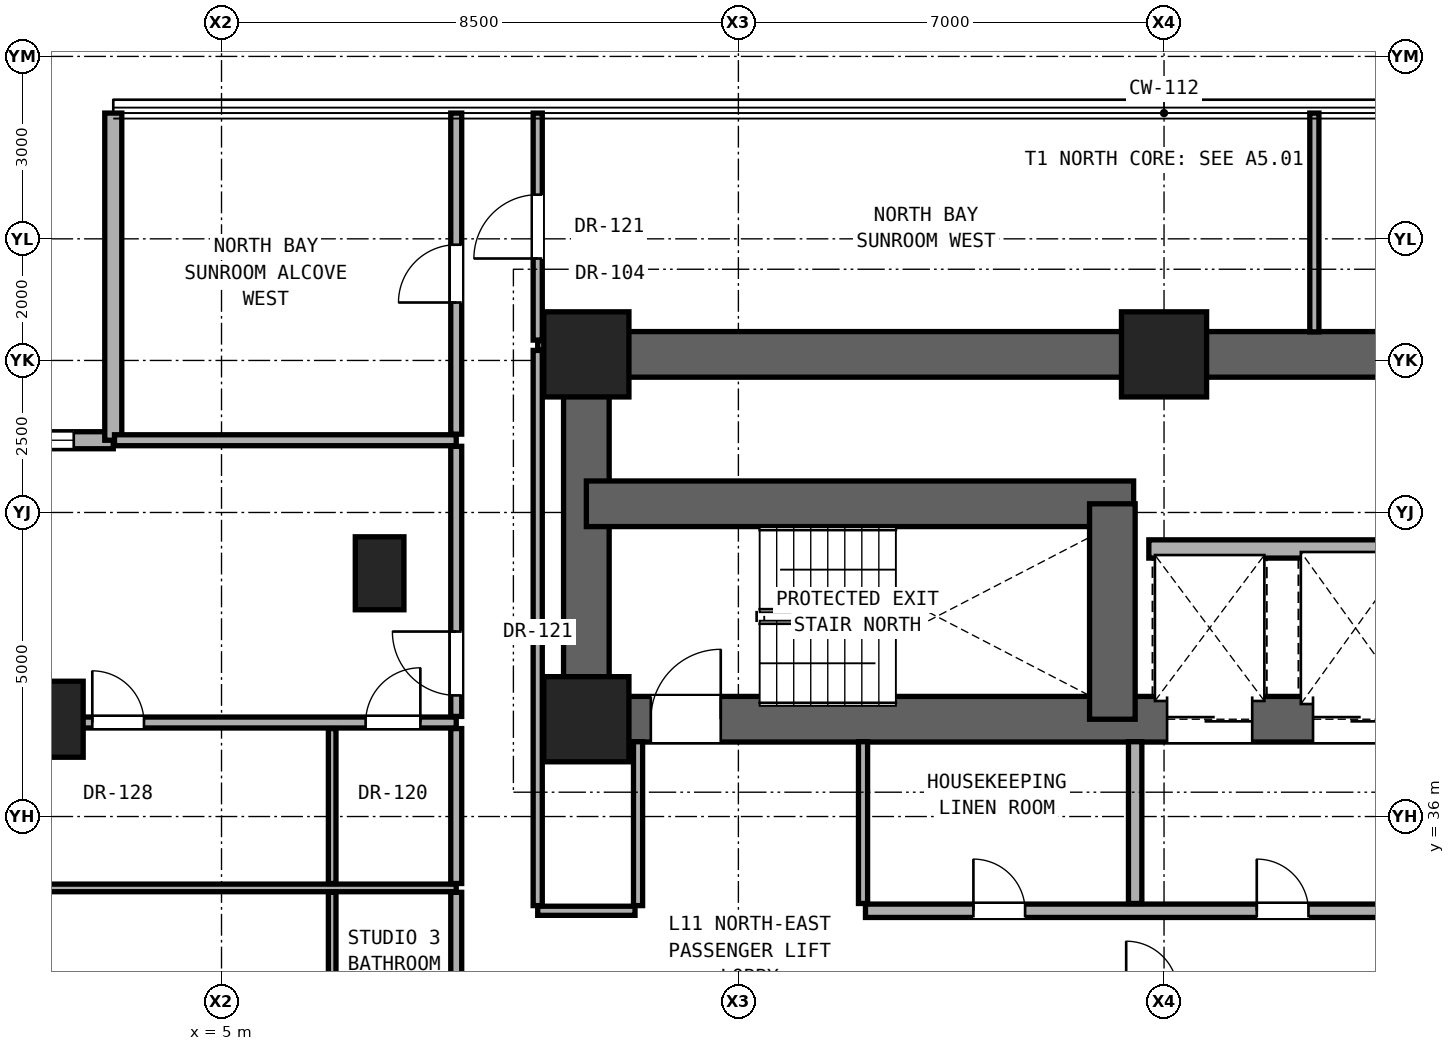
"""IFC4 building model, lengths in metres.
Left out: names, types, materials, properties, quantities, classifications, styles, units other than length and angle.
Written with IfcOpenShell. Run it as: python <this file> out.ifc"""

import sys

from ifc_helpers import new_model, si_unit, direction, frame, frame_2d, origin, origin_2d, place, context, subcontext, project, spatial, rectangle, hollow_rectangle, extrude, element, fill, save


model = new_model("IFC4")
c1 = context("Model", 3, precision=1e-05, world=origin(), true_north=direction((0.0, 1.0)))
c2 = subcontext(c1, "Body", "Model", "MODEL_VIEW")
j1 = project(units=[si_unit("LENGTHUNIT", "METRE"), si_unit("PLANEANGLEUNIT", "RADIAN")], contexts=[c1])
p1 = place(None, origin())
s1 = spatial("IfcSite", under=j1, at=p1, CompositionType="ELEMENT")
p2 = place(p1, origin())
s2 = spatial("IfcBuilding", under=s1, at=p2, CompositionType="ELEMENT")
p3 = place(p2, frame((0.0, 0.0, 42.2)))
s3 = spatial("IfcBuildingStorey", under=s2, at=p3, CompositionType="ELEMENT", Elevation=42.2)
for number, where, z_axis, x_axis in (
    (1, (11.0, 37.6, 0.0), (0.0, 0.0, 1.0), (1.0, 0.0, 0.0)),
    (2, (11.0, 43.6, 0.0), (0.0, 0.0, 1.0), (1.0, 0.0, 0.0)),
    (3, (20.5, 43.6, 0.0), (0.0, 0.0, 1.0), (1.0, 0.0, 0.0)),
):
    element("IfcColumn", number, at=place(p3, frame(where, z_axis=z_axis, x_axis=x_axis)), inside=s3, PredefinedType="COLUMN", context=c2, shape_type="SweptSolid", body=[
        extrude(rectangle(XDim=1.4, YDim=1.4, at=origin_2d()), origin(), (0.0, 0.0, 1.0), 3.3),
    ])
p4 = place(p3, frame((2.1, 37.6, 0.0), z_axis=(0.0, 0.0, 1.0), x_axis=(1.0, 0.0, 0.0)))
e4 = element("IfcColumn", 4, at=p4, inside=s3, PredefinedType="COLUMN", context=c2, shape_type="SweptSolid", body=[
    extrude(hollow_rectangle(XDim=1.25, YDim=1.25, WallThickness=0.07, at=origin_2d()), origin(), (0.0, 0.0, 1.0), 3.3),
])
p5 = place(p3, frame((7.6, 40.0, 0.0), z_axis=(0.0, 0.0, 1.0), x_axis=(1.0, 0.0, 0.0)))
e5 = element("IfcColumn", 5, at=p5, inside=s3, PredefinedType="PILASTER", context=c2, shape_type="SweptSolid", body=[
    extrude(rectangle(XDim=0.8, YDim=1.2, at=origin_2d()), origin(), (0.0, 0.0, 1.0), 3.3),
])
p6 = place(p3, frame((11.0, 43.6, 0.0), z_axis=(0.0, 0.0, 1.0), x_axis=(1.0, 0.0, 0.0)))
e6 = element("IfcWall", 6, at=p6, inside=s3, PredefinedType="SHEAR", context=c2, shape_type="SweptSolid", body=[
    extrude(rectangle(XDim=19.0, YDim=0.75, at=frame_2d((9.5, 0.0))), origin(), (0.0, 0.0, 1.0), 3.06),
])
p7 = place(p3, frame((11.0, 37.6, 0.0), z_axis=(0.0, 0.0, 1.0), x_axis=(0.0, 1.0, 0.0)))
e7 = element("IfcWall", 7, at=p7, inside=s3, PredefinedType="SHEAR", context=c2, shape_type="SweptSolid", body=[
    extrude(rectangle(XDim=6.0, YDim=0.75, at=frame_2d((3.0, 0.0))), origin(), (0.0, 0.0, 1.0), 3.06),
])
p8 = place(p3, frame((11.0, 37.6, 0.0), z_axis=(0.0, 0.0, 1.0), x_axis=(1.0, 0.0, 0.0)))
e8 = element("IfcWall", 8, at=p8, inside=s3, PredefinedType="SHEAR", context=c2, shape_type="SweptSolid", body=[
    extrude(rectangle(XDim=19.0, YDim=0.75, at=frame_2d((9.5, 0.0))), origin(), (0.0, 0.0, 1.0), 3.06),
])
p9 = place(p8, frame((1.06, 0.0, 0.0)))
e9 = element("IfcOpeningElement", 9, at=p9, cuts=e8, PredefinedType="OPENING", context=c2, shape_type="SweptSolid", body=[
    extrude(rectangle(XDim=1.15, YDim=2.2, at=frame_2d((0.575, 1.1))), frame((0.0, 0.385, 0.0), z_axis=(0.0, -1.0, 0.0), x_axis=(1.0, 0.0, 0.0)), (0.0, 0.0, 1.0), 0.77),
])
p10 = place(p8, frame((9.55, 0.0, 0.0)))
e10 = element("IfcOpeningElement", 10, at=p10, cuts=e8, PredefinedType="OPENING", context=c2, shape_type="SweptSolid", body=[
    extrude(rectangle(XDim=1.4, YDim=2.35, at=frame_2d((0.7, 1.175))), frame((0.0, 0.385, 0.0), z_axis=(0.0, -1.0, 0.0), x_axis=(1.0, 0.0, 0.0)), (0.0, 0.0, 1.0), 0.77),
])
p11 = place(p8, frame((11.95, 0.0, 0.0)))
e11 = element("IfcOpeningElement", 11, at=p11, cuts=e8, PredefinedType="OPENING", context=c2, shape_type="SweptSolid", body=[
    extrude(rectangle(XDim=1.4, YDim=2.35, at=frame_2d((0.7, 1.175))), frame((0.0, 0.385, 0.0), z_axis=(0.0, -1.0, 0.0), x_axis=(1.0, 0.0, 0.0)), (0.0, 0.0, 1.0), 0.77),
])
p12 = place(p8, frame((14.4, 0.0, 0.0)))
e12 = element("IfcOpeningElement", 12, at=p12, cuts=e8, PredefinedType="OPENING", context=c2, shape_type="SweptSolid", body=[
    extrude(rectangle(XDim=1.3, YDim=2.3, at=frame_2d((0.65, 1.15))), frame((0.0, 0.385, 0.0), z_axis=(0.0, -1.0, 0.0), x_axis=(1.0, 0.0, 0.0)), (0.0, 0.0, 1.0), 0.77),
])
p13 = place(p8, frame((16.6, 0.0, 0.0)))
e13 = element("IfcOpeningElement", 13, at=p13, cuts=e8, PredefinedType="OPENING", context=c2, shape_type="SweptSolid", body=[
    extrude(rectangle(XDim=1.3, YDim=2.3, at=frame_2d((0.65, 1.15))), frame((0.0, 0.385, 0.0), z_axis=(0.0, -1.0, 0.0), x_axis=(1.0, 0.0, 0.0)), (0.0, 0.0, 1.0), 0.77),
])
p14 = place(p3, frame((11.0, 41.143, 0.0), z_axis=(0.0, 0.0, 1.0), x_axis=(1.0, 0.0, 0.0)))
e14 = element("IfcWall", 14, at=p14, inside=s3, PredefinedType="SHEAR", context=c2, shape_type="SweptSolid", body=[
    extrude(rectangle(XDim=9.0, YDim=0.75, at=frame_2d((4.5, 0.0))), origin(), (0.0, 0.0, 1.0), 3.06),
])
p15 = place(p3, frame((19.65, 37.6, 0.0), z_axis=(0.0, 0.0, 1.0), x_axis=(0.0, 1.0, 0.0)))
e15 = element("IfcWall", 15, at=p15, inside=s3, PredefinedType="SHEAR", context=c2, shape_type="SweptSolid", body=[
    extrude(rectangle(XDim=3.543, YDim=0.75, at=frame_2d((1.771, 0.0))), origin(), (0.0, 0.0, 1.0), 3.06),
])
p16 = place(p3, frame((3.22, 42.188, 0.0), z_axis=(0.0, 0.0, 1.0), x_axis=(-1.0, 0.0, 0.0)))
e16 = element("IfcWall", 16, at=p16, inside=s3, PredefinedType="SOLIDWALL", context=c2, shape_type="SweptSolid", body=[
    extrude(rectangle(XDim=5.38, YDim=0.28, at=frame_2d((2.69, 0.0))), origin(), (0.0, 0.0, 1.0), 3.04),
])
p17 = place(p16, frame((0.65, 0.0, 0.85)))
e17 = element("IfcOpeningElement", 17, at=p17, cuts=e16, PredefinedType="OPENING", context=c2, shape_type="SweptSolid", body=[
    extrude(rectangle(XDim=1.1, YDim=2.0, at=frame_2d((0.55, 1.0))), frame((0.0, 0.15, 0.0), z_axis=(0.0, -1.0, 0.0), x_axis=(1.0, 0.0, 0.0)), (0.0, 0.0, 1.0), 0.3),
])
p18 = place(p3, frame((3.22, 47.568, 0.0), z_axis=(0.0, 0.0, 1.0), x_axis=(0.0, -1.0, 0.0)))
e18 = element("IfcWall", 18, at=p18, inside=s3, PredefinedType="SOLIDWALL", context=c2, shape_type="SweptSolid", body=[
    extrude(rectangle(XDim=5.38, YDim=0.28, at=frame_2d((2.69, 0.0))), origin(), (0.0, 0.0, 1.0), 3.04),
])
p19 = place(p3, frame((10.2, 34.45, 0.0), z_axis=(0.0, 0.0, 1.0), x_axis=(1.0, 0.0, 0.0)))
e19 = element("IfcWall", 19, at=p19, inside=s3, PredefinedType="PARTITIONING", context=c2, shape_type="SweptSolid", body=[
    extrude(rectangle(XDim=1.6, YDim=0.15, at=frame_2d((0.8, 0.0))), origin(), (0.0, 0.0, 1.0), 2.104),
])
p20 = place(p3, frame((15.59, 34.45, 0.0), z_axis=(0.0, 0.0, 1.0), x_axis=(1.0, 0.0, 0.0)))
e20 = element("IfcWall", 20, at=p20, inside=s3, PredefinedType="SOLIDWALL", context=c2, shape_type="SweptSolid", body=[
    extrude(rectangle(XDim=15.21, YDim=0.22, at=frame_2d((7.605, 0.0))), origin(), (0.0, 0.0, 1.0), 2.104),
])
p21 = place(p20, frame((6.435, 0.0, 0.0)))
e21 = element("IfcOpeningElement", 21, at=p21, cuts=e20, PredefinedType="OPENING", context=c2, shape_type="SweptSolid", body=[
    extrude(rectangle(XDim=0.85, YDim=2.01, at=frame_2d((0.425, 1.005))), frame((0.0, 0.12, 0.0), z_axis=(0.0, -1.0, 0.0), x_axis=(1.0, 0.0, 0.0)), (0.0, 0.0, 1.0), 0.24),
])
p22 = place(p20, frame((11.135, 0.0, 0.0)))
e22 = element("IfcOpeningElement", 22, at=p22, cuts=e20, PredefinedType="OPENING", context=c2, shape_type="SweptSolid", body=[
    extrude(rectangle(XDim=0.85, YDim=2.01, at=frame_2d((0.425, 1.005))), frame((0.0, 0.12, 0.0), z_axis=(0.0, -1.0, 0.0), x_axis=(1.0, 0.0, 0.0)), (0.0, 0.0, 1.0), 0.24),
])
p23 = place(p20, frame((1.775, 0.0, 0.0)))
e23 = element("IfcOpeningElement", 23, at=p23, cuts=e20, PredefinedType="OPENING", context=c2, shape_type="SweptSolid", body=[
    extrude(rectangle(XDim=0.85, YDim=2.01, at=frame_2d((0.425, 1.005))), frame((0.0, 0.12, 0.0), z_axis=(0.0, -1.0, 0.0), x_axis=(1.0, 0.0, 0.0)), (0.0, 0.0, 1.0), 0.24),
])
p24 = place(p3, frame((-2.16, 34.826, 0.0), z_axis=(0.0, 0.0, 1.0), x_axis=(1.0, 0.0, 0.0)))
e24 = element("IfcWall", 24, at=p24, inside=s3, PredefinedType="PARTITIONING", context=c2, shape_type="SweptSolid", body=[
    extrude(rectangle(XDim=11.02, YDim=0.125, at=frame_2d((5.51, 0.0))), origin(), (0.0, 0.0, 1.0), 2.125),
])
p25 = place(p3, frame((-2.16, 37.546, 0.0), z_axis=(0.0, 0.0, 1.0), x_axis=(1.0, 0.0, 0.0)))
e25 = element("IfcWall", 25, at=p25, inside=s3, PredefinedType="PARTITIONING", context=c2, shape_type="SweptSolid", body=[
    extrude(rectangle(XDim=11.02, YDim=0.18, at=frame_2d((5.51, 0.0))), origin(), (0.0, 0.0, 1.0), 2.125),
])
p26 = place(p25, frame((5.035, 0.0, 0.0)))
e26 = element("IfcOpeningElement", 26, at=p26, cuts=e25, PredefinedType="OPENING", context=c2, shape_type="SweptSolid", body=[
    extrude(rectangle(XDim=0.85, YDim=2.01, at=frame_2d((0.425, 1.005))), frame((0.0, 0.1, 0.0), z_axis=(0.0, -1.0, 0.0), x_axis=(1.0, 0.0, 0.0)), (0.0, 0.0, 1.0), 0.2),
])
p27 = place(p25, frame((9.53, 0.0, 0.0)))
e27 = element("IfcOpeningElement", 27, at=p27, cuts=e25, PredefinedType="OPENING", context=c2, shape_type="SweptSolid", body=[
    extrude(rectangle(XDim=0.9, YDim=2.1, at=frame_2d((0.45, 1.05))), frame((0.0, 0.1, 0.0), z_axis=(0.0, -1.0, 0.0), x_axis=(1.0, 0.0, 0.0)), (0.0, 0.0, 1.0), 0.2),
])
p28 = place(p3, frame((20.25, 40.4, 0.0), z_axis=(0.0, 0.0, 1.0), x_axis=(1.0, 0.0, 0.0)))
e28 = element("IfcWall", 28, at=p28, inside=s3, PredefinedType="SOLIDWALL", context=c2, shape_type="SweptSolid", body=[
    extrude(rectangle(XDim=4.4, YDim=0.3, at=frame_2d((2.2, 0.0))), origin(), (0.0, 0.0, 1.0), 3.06),
])
p29 = place(p3, frame((3.24, 42.188, 0.0), z_axis=(0.0, 0.0, 1.0), x_axis=(1.0, 0.0, 0.0)))
e29 = element("IfcWall", 29, at=p29, inside=s3, PredefinedType="PARTITIONING", context=c2, shape_type="SweptSolid", body=[
    extrude(rectangle(XDim=5.62, YDim=0.18, at=frame_2d((2.81, 0.0))), origin(), (0.0, 0.0, 1.0), 3.06),
])
p30 = place(p3, frame((10.2, 43.75, 0.0), z_axis=(0.0, 0.0, 1.0), x_axis=(1.0, 0.0, 0.0)))
e30 = element("IfcWall", 30, at=p30, inside=s3, PredefinedType="PARTITIONING", context=c2, shape_type="SweptSolid", body=[
    extrude(rectangle(XDim=0.43, YDim=0.15, at=frame_2d((0.215, 0.0))), origin(), (0.0, 0.0, 1.0), 3.06),
])
p31 = place(p3, frame((6.82, 32.206, 0.0), z_axis=(0.0, 0.0, 1.0), x_axis=(0.0, 1.0, 0.0)))
e31 = element("IfcWall", 31, at=p31, inside=s3, PredefinedType="PARTITIONING", context=c2, shape_type="SweptSolid", body=[
    extrude(rectangle(XDim=2.547, YDim=0.125, at=frame_2d((1.274, 0.0))), origin(), (0.0, 0.0, 1.0), 3.06),
])
p32 = place(p3, frame((6.82, 34.898, 0.0), z_axis=(0.0, 0.0, 1.0), x_axis=(0.0, 1.0, 0.0)))
e32 = element("IfcWall", 32, at=p32, inside=s3, PredefinedType="PARTITIONING", context=c2, shape_type="SweptSolid", body=[
    extrude(rectangle(XDim=2.548, YDim=0.125, at=frame_2d((1.274, 0.0))), origin(), (0.0, 0.0, 1.0), 2.452),
])
p33 = place(p3, frame((8.86, 32.206, 0.0), z_axis=(0.0, 0.0, 1.0), x_axis=(0.0, 1.0, 0.0)))
e33 = element("IfcWall", 33, at=p33, inside=s3, PredefinedType="PARTITIONING", context=c2, shape_type="SweptSolid", body=[
    extrude(rectangle(XDim=2.547, YDim=0.18, at=frame_2d((1.274, 0.0))), origin(), (0.0, 0.0, 1.0), 3.06),
])
p34 = place(p3, frame((8.86, 34.898, 0.0), z_axis=(0.0, 0.0, 1.0), x_axis=(0.0, 1.0, 0.0)))
e34 = element("IfcWall", 34, at=p34, inside=s3, PredefinedType="PARTITIONING", context=c2, shape_type="SweptSolid", body=[
    extrude(rectangle(XDim=2.548, YDim=0.18, at=frame_2d((1.274, 0.0))), origin(), (0.0, 0.0, 1.0), 2.452),
])
p35 = place(p3, frame((8.86, 37.646, 0.0), z_axis=(0.0, 0.0, 1.0), x_axis=(0.0, 1.0, 0.0)))
e35 = element("IfcWall", 35, at=p35, inside=s3, PredefinedType="PARTITIONING", context=c2, shape_type="SweptSolid", body=[
    extrude(rectangle(XDim=4.442, YDim=0.18, at=frame_2d((2.221, 0.0))), origin(), (0.0, 0.0, 1.0), 2.436),
])
p36 = place(p35, frame((0.346, 0.0, 0.0)))
e36 = element("IfcOpeningElement", 36, at=p36, cuts=e35, PredefinedType="OPENING", context=c2, shape_type="SweptSolid", body=[
    extrude(rectangle(XDim=1.05, YDim=2.2, at=frame_2d((0.525, 1.1))), frame((0.0, 0.1, 0.0), z_axis=(0.0, -1.0, 0.0), x_axis=(1.0, 0.0, 0.0)), (0.0, 0.0, 1.0), 0.2),
])
p37 = place(p3, frame((8.86, 42.288, 0.0), z_axis=(0.0, 0.0, 1.0), x_axis=(0.0, 1.0, 0.0)))
e37 = element("IfcWall", 37, at=p37, inside=s3, PredefinedType="PARTITIONING", context=c2, shape_type="SweptSolid", body=[
    extrude(rectangle(XDim=5.28, YDim=0.18, at=frame_2d((2.64, 0.0))), origin(), (0.0, 0.0, 1.0), 3.06),
])
p38 = place(p37, frame((2.165, 0.0, 0.0)))
e38 = element("IfcOpeningElement", 38, at=p38, cuts=e37, PredefinedType="OPENING", context=c2, shape_type="SweptSolid", body=[
    extrude(rectangle(XDim=0.95, YDim=2.15, at=frame_2d((0.475, 1.075))), frame((0.0, 0.1, 0.0), z_axis=(0.0, -1.0, 0.0), x_axis=(1.0, 0.0, 0.0)), (0.0, 0.0, 1.0), 0.2),
])
p39 = place(p3, frame((10.2, 34.535, 0.0), z_axis=(0.0, 0.0, 1.0), x_axis=(0.0, 1.0, 0.0)))
e39 = element("IfcWall", 39, at=p39, inside=s3, PredefinedType="PARTITIONING", context=c2, shape_type="SweptSolid", body=[
    extrude(rectangle(XDim=9.13, YDim=0.15, at=frame_2d((4.565, 0.0))), origin(), (0.0, 0.0, 1.0), 2.436),
])
p40 = place(p3, frame((10.2, 43.835, 0.0), z_axis=(0.0, 0.0, 1.0), x_axis=(0.0, 1.0, 0.0)))
e40 = element("IfcWall", 40, at=p40, inside=s3, PredefinedType="PARTITIONING", context=c2, shape_type="SweptSolid", body=[
    extrude(rectangle(XDim=3.733, YDim=0.15, at=frame_2d((1.867, 0.0))), origin(), (0.0, 0.0, 1.0), 3.06),
])
p41 = place(p40, frame((1.342, 0.0, 0.0)))
e41 = element("IfcOpeningElement", 41, at=p41, cuts=e40, PredefinedType="OPENING", context=c2, shape_type="SweptSolid", body=[
    extrude(rectangle(XDim=1.05, YDim=2.2, at=frame_2d((0.525, 1.1))), frame((0.0, 0.085, 0.0), z_axis=(0.0, -1.0, 0.0), x_axis=(1.0, 0.0, 0.0)), (0.0, 0.0, 1.0), 0.17),
])
p42 = place(p3, frame((11.85, 34.535, 0.0), z_axis=(0.0, 0.0, 1.0), x_axis=(0.0, 1.0, 0.0)))
e42 = element("IfcWall", 42, at=p42, inside=s3, PredefinedType="PARTITIONING", context=c2, shape_type="SweptSolid", body=[
    extrude(rectangle(XDim=2.695, YDim=0.15, at=frame_2d((1.348, 0.0))), origin(), (0.0, 0.0, 1.0), 3.06),
])
p43 = place(p3, frame((15.55, 34.57, 0.0), z_axis=(0.0, 0.0, 1.0), x_axis=(0.0, 1.0, 0.0)))
e43 = element("IfcWall", 43, at=p43, inside=s3, PredefinedType="PARTITIONING", context=c2, shape_type="SweptSolid", body=[
    extrude(rectangle(XDim=2.66, YDim=0.15, at=frame_2d((1.33, 0.0))), origin(), (0.0, 0.0, 1.0), 2.589),
])
p44 = place(p3, frame((20.025, 34.57, 0.0), z_axis=(0.0, 0.0, 1.0), x_axis=(0.0, 1.0, 0.0)))
e44 = element("IfcWall", 44, at=p44, inside=s3, PredefinedType="SOLIDWALL", context=c2, shape_type="SweptSolid", body=[
    extrude(rectangle(XDim=2.66, YDim=0.22, at=frame_2d((1.33, 0.0))), origin(), (0.0, 0.0, 1.0), 3.06),
])
p45 = place(p3, frame((22.972, 43.97, 0.0), z_axis=(0.0, 0.0, 1.0), x_axis=(0.0, 1.0, 0.0)))
e45 = element("IfcWall", 45, at=p45, inside=s3, PredefinedType="PARTITIONING", context=c2, shape_type="SweptSolid", body=[
    extrude(rectangle(XDim=3.598, YDim=0.15, at=frame_2d((1.799, 0.0))), origin(), (0.0, 0.0, 1.0), 3.06),
])
p46 = place(p17, origin())
e46 = element("IfcWindow", 46, at=p46, inside=s3, PartitioningType="SINGLE_PANEL", PredefinedType="WINDOW", context=c2, shape_type="SweptSolid", body=[
    extrude(rectangle(XDim=1.1, YDim=2.0, at=frame_2d((0.55, 1.0))), frame((0.0, 0.03, 0.0), z_axis=(0.0, -1.0, 0.0), x_axis=(1.0, 0.0, 0.0)), (0.0, 0.0, 1.0), 0.06),
])
fill(e17, e46)
p47 = place(p9, origin())
e47 = element("IfcDoor", 47, at=p47, inside=s3, OperationType="SINGLE_SWING_RIGHT", PredefinedType="DOOR", context=c2, shape_type="SweptSolid", body=[
    extrude(rectangle(XDim=1.15, YDim=2.2, at=frame_2d((0.575, 1.1))), frame((0.0, 0.025, 0.0), z_axis=(0.0, -1.0, 0.0), x_axis=(1.0, 0.0, 0.0)), (0.0, 0.0, 1.0), 0.05),
])
fill(e9, e47)
p48 = place(p21, origin())
e48 = element("IfcDoor", 48, at=p48, inside=s3, OperationType="SINGLE_SWING_LEFT", PredefinedType="DOOR", context=c2, shape_type="SweptSolid", body=[
    extrude(rectangle(XDim=0.85, YDim=2.01, at=frame_2d((0.425, 1.005))), frame((0.0, 0.025, 0.0), z_axis=(0.0, -1.0, 0.0), x_axis=(1.0, 0.0, 0.0)), (0.0, 0.0, 1.0), 0.05),
])
fill(e21, e48)
p49 = place(p23, origin())
e49 = element("IfcDoor", 49, at=p49, inside=s3, OperationType="SINGLE_SWING_LEFT", PredefinedType="DOOR", context=c2, shape_type="SweptSolid", body=[
    extrude(rectangle(XDim=0.85, YDim=2.01, at=frame_2d((0.425, 1.005))), frame((0.0, 0.025, 0.0), z_axis=(0.0, -1.0, 0.0), x_axis=(1.0, 0.0, 0.0)), (0.0, 0.0, 1.0), 0.05),
])
fill(e23, e49)
p50 = place(p36, origin())
e50 = element("IfcDoor", 50, at=p50, inside=s3, OperationType="SINGLE_SWING_RIGHT", PredefinedType="DOOR", context=c2, shape_type="SweptSolid", body=[
    extrude(rectangle(XDim=1.05, YDim=2.2, at=frame_2d((0.525, 1.1))), frame((0.0, 0.025, 0.0), z_axis=(0.0, -1.0, 0.0), x_axis=(1.0, 0.0, 0.0)), (0.0, 0.0, 1.0), 0.05),
])
fill(e36, e50)
p51 = place(p26, origin())
e51 = element("IfcDoor", 51, at=p51, inside=s3, OperationType="SINGLE_SWING_LEFT", PredefinedType="DOOR", context=c2, shape_type="SweptSolid", body=[
    extrude(rectangle(XDim=0.85, YDim=2.01, at=frame_2d((0.425, 1.005))), frame((0.0, 0.025, 0.0), z_axis=(0.0, -1.0, 0.0), x_axis=(1.0, 0.0, 0.0)), (0.0, 0.0, 1.0), 0.05),
])
fill(e26, e51)
p52 = place(p27, origin())
e52 = element("IfcDoor", 52, at=p52, inside=s3, OperationType="SINGLE_SWING_RIGHT", PredefinedType="DOOR", context=c2, shape_type="SweptSolid", body=[
    extrude(rectangle(XDim=0.9, YDim=2.1, at=frame_2d((0.45, 1.05))), frame((0.0, 0.025, 0.0), z_axis=(0.0, -1.0, 0.0), x_axis=(1.0, 0.0, 0.0)), (0.0, 0.0, 1.0), 0.05),
])
fill(e27, e52)
p53 = place(p41, origin())
e53 = element("IfcDoor", 53, at=p53, inside=s3, OperationType="SINGLE_SWING_LEFT", PredefinedType="DOOR", context=c2, shape_type="SweptSolid", body=[
    extrude(rectangle(XDim=1.05, YDim=2.2, at=frame_2d((0.525, 1.1))), frame((0.0, 0.025, 0.0), z_axis=(0.0, -1.0, 0.0), x_axis=(1.0, 0.0, 0.0)), (0.0, 0.0, 1.0), 0.05),
])
fill(e41, e53)
p54 = place(p38, origin())
e54 = element("IfcDoor", 54, at=p54, inside=s3, OperationType="SINGLE_SWING_LEFT", PredefinedType="DOOR", context=c2, shape_type="SweptSolid", body=[
    extrude(rectangle(XDim=0.95, YDim=2.15, at=frame_2d((0.475, 1.075))), frame((0.0, 0.025, 0.0), z_axis=(0.0, -1.0, 0.0), x_axis=(1.0, 0.0, 0.0)), (0.0, 0.0, 1.0), 0.05),
])
fill(e38, e54)
p55 = place(p10, origin())
e55 = element("IfcDoor", 55, at=p55, inside=s3, OperationType="DOUBLE_DOOR_SLIDING", PredefinedType="DOOR", context=c2, shape_type="SweptSolid", body=[
    extrude(rectangle(XDim=1.4, YDim=2.35, at=frame_2d((0.7, 1.175))), frame((0.0, 0.025, 0.0), z_axis=(0.0, -1.0, 0.0), x_axis=(1.0, 0.0, 0.0)), (0.0, 0.0, 1.0), 0.05),
])
fill(e10, e55)
p56 = place(p11, origin())
e56 = element("IfcDoor", 56, at=p56, inside=s3, OperationType="DOUBLE_DOOR_SLIDING", PredefinedType="DOOR", context=c2, shape_type="SweptSolid", body=[
    extrude(rectangle(XDim=1.4, YDim=2.35, at=frame_2d((0.7, 1.175))), frame((0.0, 0.025, 0.0), z_axis=(0.0, -1.0, 0.0), x_axis=(1.0, 0.0, 0.0)), (0.0, 0.0, 1.0), 0.05),
])
fill(e11, e56)
save(model, sys.argv[1])
